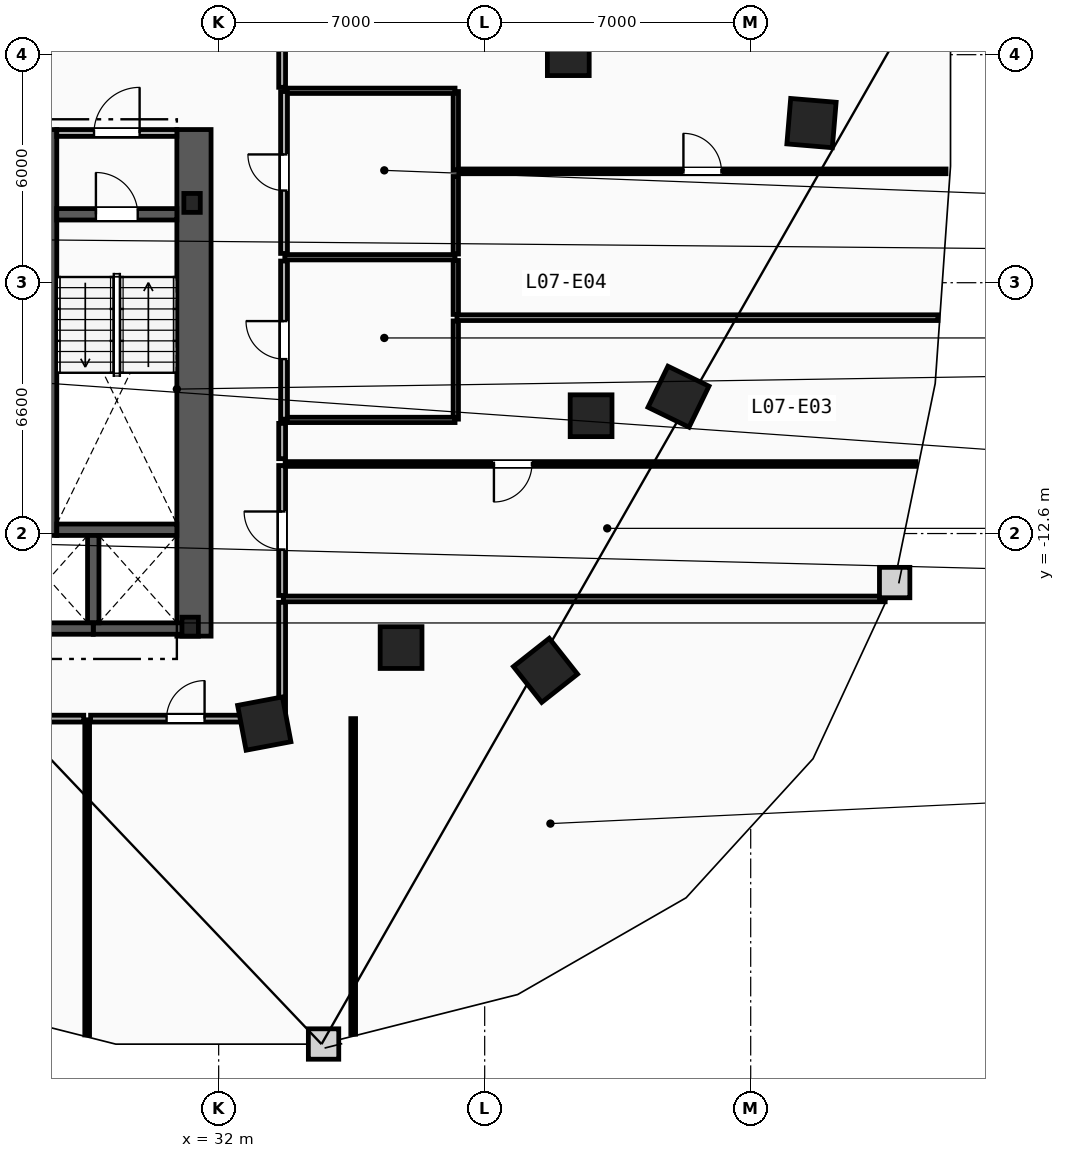
"""IFC4 building model, lengths in metres.
Left out: names, types, materials, properties, quantities, classifications, styles, units other than length and angle.
Written with IfcOpenShell. Run it as: python <this file> out.ifc"""

import sys

from ifc_helpers import new_model, si_unit, direction, frame, frame_2d, origin, origin_2d, place, context, subcontext, project, spatial, rectangle, i_section, extrude, element, fill, save


model = new_model("IFC4")
c1 = context("Model", 3, precision=1e-05, world=origin(), true_north=direction((0.0, 1.0)))
c2 = subcontext(c1, "Body", "Model", "MODEL_VIEW")
j1 = project(units=[si_unit("LENGTHUNIT", "METRE"), si_unit("PLANEANGLEUNIT", "RADIAN")], contexts=[c1])
p1 = place(None, origin())
s1 = spatial("IfcSite", under=j1, at=p1, CompositionType="ELEMENT")
p2 = place(p1, origin())
s2 = spatial("IfcBuilding", under=s1, at=p2, CompositionType="ELEMENT")
p3 = place(p2, frame((0.0, 0.0, 31.6)))
s3 = spatial("IfcBuildingStorey", under=s2, at=p3, CompositionType="ELEMENT", Elevation=31.6)
for number, where, z_axis, x_axis in (
    (1, (31.3, -3.9, 0.0), (0.0, 0.0, 1.0), (1.0, 0.0, 0.0)),
    (2, (31.25, -15.05, 0.0), (0.0, 0.0, 1.0), (1.0, 0.0, 0.0)),
):
    element("IfcColumn", number, at=place(p3, frame(where, z_axis=z_axis, x_axis=x_axis)), inside=s3, PredefinedType="COLUMN", context=c2, shape_type="SweptSolid", body=[
        extrude(i_section(OverallWidth=0.432, OverallDepth=0.498, WebThickness=0.056, FlangeThickness=0.089, FilletRadius=0.018, at=origin_2d()), origin(), (0.0, 0.0, 1.0), 3.8),
    ])
for number, where, z_axis, x_axis in (
    (3, (41.2, 0.0, 0.0), (0.0, 0.0, 1.0), (1.0, 0.0, 0.0)),
    (4, (41.8, -9.5, 0.0), (0.0, 0.0, 1.0), (1.0, 0.0, 0.0)),
    (5, (36.8, -15.6, 0.0), (0.0, 0.0, 1.0), (1.0, 0.0, 0.0)),
):
    element("IfcColumn", number, at=place(p3, frame(where, z_axis=z_axis, x_axis=x_axis)), inside=s3, PredefinedType="COLUMN", context=c2, shape_type="SweptSolid", body=[
        extrude(rectangle(XDim=1.1, YDim=1.1, at=origin_2d()), origin(), (0.0, 0.0, 1.0), 3.8),
    ])
for number, where, z_axis, x_axis in (
    (6, (33.2, -17.6, 0.0), (0.0, 0.0, 1.0), (0.983, 0.186, 0.0)),
    (7, (40.6, -16.2, 0.0), (0.0, 0.0, 1.0), (0.785, 0.619, 0.0)),
    (8, (44.1, -9.0, 0.0), (0.0, 0.0, 1.0), (0.437, 0.899, 0.0)),
    (9, (47.6, -1.8, 0.0), (0.0, 0.0, 1.0), (0.084, 0.997, 0.0)),
):
    element("IfcColumn", number, at=place(p3, frame(where, z_axis=z_axis, x_axis=x_axis)), inside=s3, PredefinedType="COLUMN", context=c2, shape_type="SweptSolid", body=[
        extrude(rectangle(XDim=1.2, YDim=1.2, at=origin_2d()), origin(), (0.0, 0.0, 1.0), 3.8),
    ])
p4 = place(p3, frame((31.35, -15.3, 0.0), z_axis=(0.0, 0.0, 1.0), x_axis=(0.0, 1.0, 0.0)))
e10 = element("IfcWall", 10, at=p4, inside=s3, PredefinedType="SHEAR", context=c2, shape_type="SweptSolid", body=[
    extrude(rectangle(XDim=13.33, YDim=0.9, at=frame_2d((6.665, 0.0))), origin(), (0.0, 0.0, 1.0), 3.5),
])
p5 = place(p3, frame((27.59, -12.65, 0.0), z_axis=(0.0, 0.0, 1.0), x_axis=(0.0, 1.0, 0.0)))
e11 = element("IfcWall", 11, at=p5, inside=s3, PredefinedType="SHEAR", context=c2, shape_type="SweptSolid", body=[
    extrude(rectangle(XDim=10.68, YDim=0.3, at=frame_2d((5.34, 0.0))), origin(), (0.0, 0.0, 1.0), 3.5),
])
p6 = place(p3, frame((27.74, -4.2, 0.0), z_axis=(0.0, 0.0, 1.0), x_axis=(1.0, 0.0, 0.0)))
e12 = element("IfcWall", 12, at=p6, inside=s3, PredefinedType="SHEAR", context=c2, shape_type="SweptSolid", body=[
    extrude(rectangle(XDim=3.16, YDim=0.3, at=frame_2d((1.58, 0.0))), origin(), (0.0, 0.0, 1.0), 3.5),
])
p7 = place(p6, frame((1.03, 0.0, 0.0)))
e13 = element("IfcOpeningElement", 13, at=p7, cuts=e12, PredefinedType="OPENING", context=c2, shape_type="SweptSolid", body=[
    extrude(rectangle(XDim=1.1, YDim=2.15, at=frame_2d((0.55, 1.075))), frame((0.0, 0.16, 0.0), z_axis=(0.0, -1.0, 0.0), x_axis=(1.0, 0.0, 0.0)), (0.0, 0.0, 1.0), 0.32),
])
p8 = place(p3, frame((27.74, -12.5, 0.0), z_axis=(0.0, 0.0, 1.0), x_axis=(1.0, 0.0, 0.0)))
e14 = element("IfcWall", 14, at=p8, inside=s3, PredefinedType="SHEAR", context=c2, shape_type="SweptSolid", body=[
    extrude(rectangle(XDim=3.16, YDim=0.3, at=frame_2d((1.58, 0.0))), origin(), (0.0, 0.0, 1.0), 3.5),
])
p9 = place(p3, frame((27.74, -2.06, 0.0), z_axis=(0.0, 0.0, 1.0), x_axis=(1.0, 0.0, 0.0)))
e15 = element("IfcWall", 15, at=p9, inside=s3, PredefinedType="PARTITIONING", context=c2, shape_type="SweptSolid", body=[
    extrude(rectangle(XDim=3.16, YDim=0.18, at=frame_2d((1.58, 0.0))), origin(), (0.0, 0.0, 1.0), 3.5),
])
p10 = place(p9, frame((0.98, 0.0, 0.0)))
e16 = element("IfcOpeningElement", 16, at=p10, cuts=e15, PredefinedType="OPENING", context=c2, shape_type="SweptSolid", body=[
    extrude(rectangle(XDim=1.2, YDim=2.15, at=frame_2d((0.6, 1.075))), frame((0.0, 0.1, 0.0), z_axis=(0.0, -1.0, 0.0), x_axis=(1.0, 0.0, 0.0)), (0.0, 0.0, 1.0), 0.2),
])
p11 = place(p3, frame((28.7, -15.1, 0.0), z_axis=(0.0, 0.0, 1.0), x_axis=(1.0, 0.0, 0.0)))
e17 = element("IfcWall", 17, at=p11, inside=s3, PredefinedType="SHEAR", context=c2, shape_type="SweptSolid", body=[
    extrude(rectangle(XDim=2.5, YDim=0.3, at=frame_2d((1.25, 0.0))), origin(), (0.0, 0.0, 1.0), 3.5),
])
p12 = place(p3, frame((28.7, -14.95, 0.0), z_axis=(0.0, 0.0, 1.0), x_axis=(0.0, 1.0, 0.0)))
e18 = element("IfcWall", 18, at=p12, inside=s3, PredefinedType="SHEAR", context=c2, shape_type="SweptSolid", body=[
    extrude(rectangle(XDim=2.3, YDim=0.3, at=frame_2d((1.15, 0.0))), origin(), (0.0, 0.0, 1.0), 3.5),
])
p13 = place(p3, frame((26.2, -15.1, 0.0), z_axis=(0.0, 0.0, 1.0), x_axis=(1.0, 0.0, 0.0)))
e19 = element("IfcWall", 19, at=p13, inside=s3, PredefinedType="SHEAR", context=c2, shape_type="SweptSolid", body=[
    extrude(rectangle(XDim=2.5, YDim=0.3, at=frame_2d((1.25, 0.0))), origin(), (0.0, 0.0, 1.0), 3.5),
])
p14 = place(p3, frame((38.24, -9.59, 0.0), z_axis=(0.0, 0.0, 1.0), x_axis=(0.0, 1.0, 0.0)))
e20 = element("IfcWall", 20, at=p14, inside=s3, PredefinedType="PARTITIONING", context=c2, shape_type="SweptSolid", body=[
    extrude(rectangle(XDim=2.585, YDim=0.14, at=frame_2d((1.292, 0.0))), origin(), (0.0, 0.0, 1.0), 3.5),
])
p15 = place(p3, frame((38.24, -6.835, 0.0), z_axis=(0.0, 0.0, 1.0), x_axis=(0.0, 1.0, 0.0)))
e21 = element("IfcWall", 21, at=p15, inside=s3, PredefinedType="PARTITIONING", context=c2, shape_type="SweptSolid", body=[
    extrude(rectangle(XDim=1.42, YDim=0.14, at=frame_2d((0.71, 0.0))), origin(), (0.0, 0.0, 1.0), 3.5),
])
p16 = place(p3, frame((38.24, -5.245, 0.0), z_axis=(0.0, 0.0, 1.0), x_axis=(0.0, 1.0, 0.0)))
e22 = element("IfcWall", 22, at=p16, inside=s3, PredefinedType="PARTITIONING", context=c2, shape_type="SweptSolid", body=[
    extrude(rectangle(XDim=2.04, YDim=0.14, at=frame_2d((1.02, 0.0))), origin(), (0.0, 0.0, 1.0), 3.5),
])
p17 = place(p3, frame((38.24, -3.035, 0.0), z_axis=(0.0, 0.0, 1.0), x_axis=(0.0, 1.0, 0.0)))
e23 = element("IfcWall", 23, at=p17, inside=s3, PredefinedType="PARTITIONING", context=c2, shape_type="SweptSolid", body=[
    extrude(rectangle(XDim=2.065, YDim=0.14, at=frame_2d((1.032, 0.0))), origin(), (0.0, 0.0, 1.0), 3.5),
])
for number, where, z_axis, x_axis in (
    (24, (33.74, -0.95, 0.0), (0.0, 0.0, 1.0), (1.0, 0.0, 0.0)),
    (25, (33.74, -5.33, 0.0), (0.0, 0.0, 1.0), (1.0, 0.0, 0.0)),
    (26, (33.74, -9.61, 0.0), (0.0, 0.0, 1.0), (1.0, 0.0, 0.0)),
):
    element("IfcWall", number, at=place(p3, frame(where, z_axis=z_axis, x_axis=x_axis)), inside=s3, PredefinedType="PARTITIONING", context=c2, shape_type="SweptSolid", body=[
        extrude(rectangle(XDim=4.48, YDim=0.14, at=frame_2d((2.24, 0.0))), origin(), (0.0, 0.0, 1.0), 3.5),
    ])
p18 = place(p3, frame((33.72, -5.23, 0.0), z_axis=(0.0, 0.0, 1.0), x_axis=(0.0, 1.0, 0.0)))
e27 = element("IfcWall", 27, at=p18, inside=s3, PredefinedType="PARTITIONING", context=c2, shape_type="SweptSolid", body=[
    extrude(rectangle(XDim=4.26, YDim=0.18, at=frame_2d((2.13, 0.0))), origin(), (0.0, 0.0, 1.0), 3.5),
])
p19 = place(p18, frame((1.655, 0.0, 0.0)))
e28 = element("IfcOpeningElement", 28, at=p19, cuts=e27, PredefinedType="OPENING", context=c2, shape_type="SweptSolid", body=[
    extrude(rectangle(XDim=0.95, YDim=2.1, at=frame_2d((0.475, 1.05))), frame((0.0, 0.1, 0.0), z_axis=(0.0, -1.0, 0.0), x_axis=(1.0, 0.0, 0.0)), (0.0, 0.0, 1.0), 0.2),
])
p20 = place(p3, frame((33.72, -9.59, 0.0), z_axis=(0.0, 0.0, 1.0), x_axis=(0.0, 1.0, 0.0)))
e29 = element("IfcWall", 29, at=p20, inside=s3, PredefinedType="PARTITIONING", context=c2, shape_type="SweptSolid", body=[
    extrude(rectangle(XDim=4.16, YDim=0.18, at=frame_2d((2.08, 0.0))), origin(), (0.0, 0.0, 1.0), 3.5),
])
p21 = place(p20, frame((1.58, 0.0, 0.0)))
e30 = element("IfcOpeningElement", 30, at=p21, cuts=e29, PredefinedType="OPENING", context=c2, shape_type="SweptSolid", body=[
    extrude(rectangle(XDim=1.0, YDim=2.15, at=frame_2d((0.5, 1.075))), frame((0.0, 0.1, 0.0), z_axis=(0.0, -1.0, 0.0), x_axis=(1.0, 0.0, 0.0)), (0.0, 0.0, 1.0), 0.2),
])
p22 = place(p3, frame((38.27, -6.92, 0.0), z_axis=(0.0, 0.0, 1.0), x_axis=(1.0, 0.0, 0.0)))
e31 = element("IfcWall", 31, at=p22, inside=s3, PredefinedType="PARTITIONING", context=c2, shape_type="SweptSolid", body=[
    extrude(rectangle(XDim=12.657, YDim=0.15, at=frame_2d((6.329, 0.0))), origin(), (0.0, 0.0, 1.0), 3.5),
])
p23 = place(p3, frame((33.7, -14.32, 0.0), z_axis=(0.0, 0.0, 1.0), x_axis=(1.0, 0.0, 0.0)))
e32 = element("IfcWall", 32, at=p23, inside=s3, PredefinedType="PARTITIONING", context=c2, shape_type="SweptSolid", body=[
    extrude(rectangle(XDim=15.838, YDim=0.15, at=frame_2d((7.919, 0.0))), origin(), (0.0, 0.0, 1.0), 3.5),
])
p24 = place(p3, frame((28.54, -25.794, 0.0), z_axis=(0.0, 0.0, 1.0), x_axis=(0.0, 1.0, 0.0)))
e33 = element("IfcWall", 33, at=p24, inside=s3, PredefinedType="PARTITIONING", context=c2, shape_type="SweptSolid", body=[
    extrude(rectangle(XDim=8.294, YDim=0.125, at=frame_2d((4.147, 0.0))), origin(), (0.0, 0.0, 1.0), 3.5),
])
p25 = place(p3, frame((35.54, -25.773, 0.0), z_axis=(0.0, 0.0, 1.0), x_axis=(0.0, 1.0, 0.0)))
e34 = element("IfcWall", 34, at=p25, inside=s3, PredefinedType="PARTITIONING", context=c2, shape_type="SweptSolid", body=[
    extrude(rectangle(XDim=8.303, YDim=0.125, at=frame_2d((4.152, 0.0))), origin(), (0.0, 0.0, 1.0), 3.5),
])
p26 = place(p3, frame((28.63, -17.47, 0.0), z_axis=(0.0, 0.0, 1.0), x_axis=(1.0, 0.0, 0.0)))
e35 = element("IfcWall", 35, at=p26, inside=s3, PredefinedType="PARTITIONING", context=c2, shape_type="SweptSolid", body=[
    extrude(rectangle(XDim=4.999, YDim=0.18, at=frame_2d((2.499, 0.0))), origin(), (0.0, 0.0, 1.0), 3.5),
])
p27 = place(p26, frame((1.999, 0.0, 0.0)))
e36 = element("IfcOpeningElement", 36, at=p27, cuts=e35, PredefinedType="OPENING", context=c2, shape_type="SweptSolid", body=[
    extrude(rectangle(XDim=1.0, YDim=2.15, at=frame_2d((0.5, 1.075))), frame((0.0, 0.1, 0.0), z_axis=(0.0, -1.0, 0.0), x_axis=(1.0, 0.0, 0.0)), (0.0, 0.0, 1.0), 0.2),
])
p28 = place(p3, frame((33.67, -17.428, 0.0), z_axis=(0.0, 0.0, 1.0), x_axis=(0.0, 1.0, 0.0)))
e37 = element("IfcWall", 37, at=p28, inside=s3, PredefinedType="PARTITIONING", context=c2, shape_type="SweptSolid", body=[
    extrude(rectangle(XDim=3.019, YDim=0.18, at=frame_2d((1.509, 0.0))), origin(), (0.0, 0.0, 1.0), 3.5),
])
p29 = place(p3, frame((33.67, -14.23, 0.0), z_axis=(0.0, 0.0, 1.0), x_axis=(0.0, 1.0, 0.0)))
e38 = element("IfcWall", 38, at=p29, inside=s3, PredefinedType="PARTITIONING", context=c2, shape_type="SweptSolid", body=[
    extrude(rectangle(XDim=3.42, YDim=0.18, at=frame_2d((1.71, 0.0))), origin(), (0.0, 0.0, 1.0), 3.5),
])
p30 = place(p29, frame((1.21, 0.0, 0.0)))
e39 = element("IfcOpeningElement", 39, at=p30, cuts=e38, PredefinedType="OPENING", context=c2, shape_type="SweptSolid", body=[
    extrude(rectangle(XDim=1.0, YDim=2.15, at=frame_2d((0.5, 1.075))), frame((0.0, 0.1, 0.0), z_axis=(0.0, -1.0, 0.0), x_axis=(1.0, 0.0, 0.0)), (0.0, 0.0, 1.0), 0.2),
])
p31 = place(p3, frame((33.67, -10.63, 0.0), z_axis=(0.0, 0.0, 1.0), x_axis=(0.0, 1.0, 0.0)))
e40 = element("IfcWall", 40, at=p31, inside=s3, PredefinedType="PARTITIONING", context=c2, shape_type="SweptSolid", body=[
    extrude(rectangle(XDim=0.928, YDim=0.18, at=frame_2d((0.464, 0.0))), origin(), (0.0, 0.0, 1.0), 3.5),
])
p32 = place(p3, frame((33.67, -0.859, 0.0), z_axis=(0.0, 0.0, 1.0), x_axis=(0.0, 1.0, 0.0)))
e41 = element("IfcWall", 41, at=p32, inside=s3, PredefinedType="PARTITIONING", context=c2, shape_type="SweptSolid", body=[
    extrude(rectangle(XDim=12.259, YDim=0.18, at=frame_2d((6.129, 0.0))), origin(), (0.0, 0.0, 1.0), 3.5),
])
p33 = place(p3, frame((16.822, -17.47, 0.0), z_axis=(0.0, 0.0, 1.0), x_axis=(1.0, 0.0, 0.0)))
e42 = element("IfcWall", 42, at=p33, inside=s3, PredefinedType="PARTITIONING", context=c2, shape_type="SweptSolid", body=[
    extrude(rectangle(XDim=11.628, YDim=0.18, at=frame_2d((5.814, 0.0))), origin(), (0.0, 0.0, 1.0), 3.5),
])
p34 = place(p3, frame((50.343, -10.77, 0.0), z_axis=(0.0, 0.0, 1.0), x_axis=(-1.0, 0.0, 0.0)))
e43 = element("IfcWall", 43, at=p34, inside=s3, PredefinedType="PARTITIONING", context=c2, shape_type="SweptSolid", body=[
    extrude(rectangle(XDim=16.593, YDim=0.125, at=frame_2d((8.296, 0.0))), origin(), (0.0, 0.0, 1.0), 3.5),
])
p35 = place(p34, frame((10.099, 0.0, 0.0)))
e44 = element("IfcOpeningElement", 44, at=p35, cuts=e43, PredefinedType="OPENING", context=c2, shape_type="SweptSolid", body=[
    extrude(rectangle(XDim=1.0, YDim=2.15, at=frame_2d((0.5, 1.075))), frame((0.0, 0.073, 0.0), z_axis=(0.0, -1.0, 0.0), x_axis=(1.0, 0.0, 0.0)), (0.0, 0.0, 1.0), 0.145),
])
p36 = place(p3, frame((38.32, -3.07, 0.0), z_axis=(0.0, 0.0, 1.0), x_axis=(1.0, 0.0, 0.0)))
e45 = element("IfcWall", 45, at=p36, inside=s3, PredefinedType="PARTITIONING", context=c2, shape_type="SweptSolid", body=[
    extrude(rectangle(XDim=12.82, YDim=0.125, at=frame_2d((6.41, 0.0))), origin(), (0.0, 0.0, 1.0), 3.5),
])
p37 = place(p36, frame((5.91, 0.0, 0.0)))
e46 = element("IfcOpeningElement", 46, at=p37, cuts=e45, PredefinedType="OPENING", context=c2, shape_type="SweptSolid", body=[
    extrude(rectangle(XDim=1.0, YDim=2.15, at=frame_2d((0.5, 1.075))), frame((0.0, 0.073, 0.0), z_axis=(0.0, -1.0, 0.0), x_axis=(1.0, 0.0, 0.0)), (0.0, 0.0, 1.0), 0.145),
])
p38 = place(p7, origin())
e47 = element("IfcDoor", 47, at=p38, inside=s3, OperationType="SINGLE_SWING_LEFT", PredefinedType="DOOR", context=c2, shape_type="SweptSolid", body=[
    extrude(rectangle(XDim=1.1, YDim=2.15, at=frame_2d((0.55, 1.075))), frame((0.0, 0.025, 0.0), z_axis=(0.0, -1.0, 0.0), x_axis=(1.0, 0.0, 0.0)), (0.0, 0.0, 1.0), 0.05),
])
fill(e13, e47)
p39 = place(p10, origin())
e48 = element("IfcDoor", 48, at=p39, inside=s3, OperationType="SINGLE_SWING_RIGHT", PredefinedType="DOOR", context=c2, shape_type="SweptSolid", body=[
    extrude(rectangle(XDim=1.2, YDim=2.15, at=frame_2d((0.6, 1.075))), frame((0.0, 0.025, 0.0), z_axis=(0.0, -1.0, 0.0), x_axis=(1.0, 0.0, 0.0)), (0.0, 0.0, 1.0), 0.05),
])
fill(e16, e48)
p40 = place(p35, origin())
e49 = element("IfcDoor", 49, at=p40, inside=s3, OperationType="SINGLE_SWING_RIGHT", PredefinedType="DOOR", context=c2, shape_type="SweptSolid", body=[
    extrude(rectangle(XDim=1.0, YDim=2.15, at=frame_2d((0.5, 1.075))), frame((0.0, 0.025, 0.0), z_axis=(0.0, -1.0, 0.0), x_axis=(1.0, 0.0, 0.0)), (0.0, 0.0, 1.0), 0.05),
])
fill(e44, e49)
p41 = place(p37, origin())
e50 = element("IfcDoor", 50, at=p41, inside=s3, OperationType="SINGLE_SWING_LEFT", PredefinedType="DOOR", context=c2, shape_type="SweptSolid", body=[
    extrude(rectangle(XDim=1.0, YDim=2.15, at=frame_2d((0.5, 1.075))), frame((0.0, 0.025, 0.0), z_axis=(0.0, -1.0, 0.0), x_axis=(1.0, 0.0, 0.0)), (0.0, 0.0, 1.0), 0.05),
])
fill(e46, e50)
p42 = place(p27, origin())
e51 = element("IfcDoor", 51, at=p42, inside=s3, OperationType="SINGLE_SWING_RIGHT", PredefinedType="DOOR", context=c2, shape_type="SweptSolid", body=[
    extrude(rectangle(XDim=1.0, YDim=2.15, at=frame_2d((0.5, 1.075))), frame((0.0, 0.025, 0.0), z_axis=(0.0, -1.0, 0.0), x_axis=(1.0, 0.0, 0.0)), (0.0, 0.0, 1.0), 0.05),
])
fill(e36, e51)
p43 = place(p19, origin())
e52 = element("IfcDoor", 52, at=p43, inside=s3, OperationType="SINGLE_SWING_RIGHT", PredefinedType="DOOR", context=c2, shape_type="SweptSolid", body=[
    extrude(rectangle(XDim=0.95, YDim=2.1, at=frame_2d((0.475, 1.05))), frame((0.0, 0.025, 0.0), z_axis=(0.0, -1.0, 0.0), x_axis=(1.0, 0.0, 0.0)), (0.0, 0.0, 1.0), 0.05),
])
fill(e28, e52)
p44 = place(p21, origin())
e53 = element("IfcDoor", 53, at=p44, inside=s3, OperationType="SINGLE_SWING_RIGHT", PredefinedType="DOOR", context=c2, shape_type="SweptSolid", body=[
    extrude(rectangle(XDim=1.0, YDim=2.15, at=frame_2d((0.5, 1.075))), frame((0.0, 0.025, 0.0), z_axis=(0.0, -1.0, 0.0), x_axis=(1.0, 0.0, 0.0)), (0.0, 0.0, 1.0), 0.05),
])
fill(e30, e53)
p45 = place(p30, origin())
e54 = element("IfcDoor", 54, at=p45, inside=s3, OperationType="SINGLE_SWING_RIGHT", PredefinedType="DOOR", context=c2, shape_type="SweptSolid", body=[
    extrude(rectangle(XDim=1.0, YDim=2.15, at=frame_2d((0.5, 1.075))), frame((0.0, 0.025, 0.0), z_axis=(0.0, -1.0, 0.0), x_axis=(1.0, 0.0, 0.0)), (0.0, 0.0, 1.0), 0.05),
])
fill(e39, e54)
save(model, sys.argv[1])
